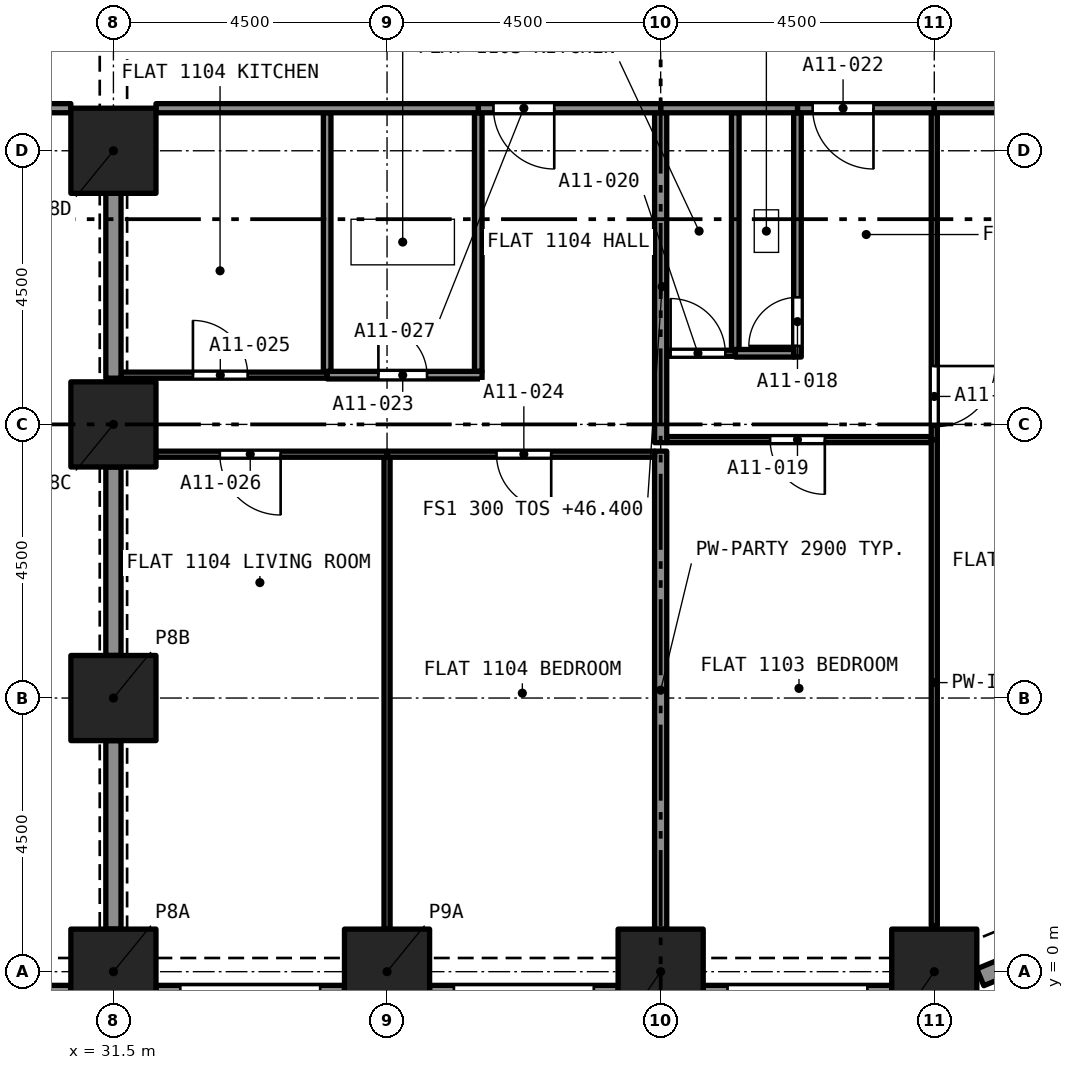
"""IFC4 building model, lengths in metres.
Left out: names, types, materials, properties, quantities, classifications, styles, units other than length and angle.
Written with IfcOpenShell. Run it as: python <this file> out.ifc"""

import sys

from ifc_helpers import new_model, si_unit, direction, frame, frame_2d, origin, origin_2d, place, context, subcontext, project, spatial, rectangle, extrude, element, fill, save


model = new_model("IFC4")
c1 = context("Model", 3, precision=1e-05, world=origin(), true_north=direction((0.0, 1.0)))
c2 = subcontext(c1, "Body", "Model", "MODEL_VIEW")
j1 = project(units=[si_unit("LENGTHUNIT", "METRE"), si_unit("PLANEANGLEUNIT", "RADIAN")], contexts=[c1])
p1 = place(None, origin())
s1 = spatial("IfcSite", under=j1, at=p1, CompositionType="ELEMENT")
p2 = place(p1, origin())
s2 = spatial("IfcBuilding", under=s1, at=p2, CompositionType="ELEMENT")
p3 = place(p2, frame((0.0, 0.0, 46.4)))
s3 = spatial("IfcBuildingStorey", under=s2, at=p3, CompositionType="ELEMENT", Elevation=46.4)
for number, where, z_axis, x_axis in (
    (1, (31.5, 0.0, 0.0), (0.0, 0.0, 1.0), (1.0, 0.0, 0.0)),
    (2, (36.0, 0.0, 0.0), (0.0, 0.0, 1.0), (1.0, 0.0, 0.0)),
    (3, (40.5, 0.0, 0.0), (0.0, 0.0, 1.0), (1.0, 0.0, 0.0)),
    (4, (45.0, 0.0, 0.0), (0.0, 0.0, 1.0), (1.0, 0.0, 0.0)),
    (5, (31.5, 4.5, 0.0), (0.0, 0.0, 1.0), (1.0, 0.0, 0.0)),
    (6, (31.5, 9.0, 0.0), (0.0, 0.0, 1.0), (1.0, 0.0, 0.0)),
    (7, (31.5, 13.5, 0.0), (0.0, 0.0, 1.0), (1.0, 0.0, 0.0)),
):
    element("IfcColumn", number, at=place(p3, frame(where, z_axis=z_axis, x_axis=x_axis)), inside=s3, PredefinedType="COLUMN", context=c2, shape_type="SweptSolid", body=[
        extrude(rectangle(XDim=1.4, YDim=1.4, at=origin_2d()), origin(), (0.0, 0.0, 1.0), 3.2),
    ])
p4 = place(p3, frame((30.8, -0.375, 0.0), z_axis=(0.0, 0.0, 1.0), x_axis=(-1.0, 0.0, 0.0)))
e8 = element("IfcWall", 8, at=p4, inside=s3, PredefinedType="SOLIDWALL", context=c2, shape_type="SweptSolid", body=[
    extrude(rectangle(XDim=3.1, YDim=0.3, at=frame_2d((1.55, 0.0))), origin(), (0.0, 0.0, 1.0), 3.2),
])
p5 = place(p4, frame((0.4, 0.0, 0.45)))
e9 = element("IfcOpeningElement", 9, at=p5, cuts=e8, PredefinedType="OPENING", context=c2, shape_type="SweptSolid", body=[
    extrude(rectangle(XDim=2.3, YDim=1.95, at=frame_2d((1.15, 0.975))), frame((0.0, 0.16, 0.0), z_axis=(0.0, -1.0, 0.0), x_axis=(1.0, 0.0, 0.0)), (0.0, 0.0, 1.0), 0.32),
])
p6 = place(p3, frame((35.3, -0.375, 0.0), z_axis=(0.0, 0.0, 1.0), x_axis=(-1.0, 0.0, 0.0)))
e10 = element("IfcWall", 10, at=p6, inside=s3, PredefinedType="SOLIDWALL", context=c2, shape_type="SweptSolid", body=[
    extrude(rectangle(XDim=3.1, YDim=0.3, at=frame_2d((1.55, 0.0))), origin(), (0.0, 0.0, 1.0), 3.2),
])
p7 = place(p6, frame((0.4, 0.0, 0.45)))
e11 = element("IfcOpeningElement", 11, at=p7, cuts=e10, PredefinedType="OPENING", context=c2, shape_type="SweptSolid", body=[
    extrude(rectangle(XDim=2.3, YDim=1.95, at=frame_2d((1.15, 0.975))), frame((0.0, 0.16, 0.0), z_axis=(0.0, -1.0, 0.0), x_axis=(1.0, 0.0, 0.0)), (0.0, 0.0, 1.0), 0.32),
])
p8 = place(p3, frame((39.8, -0.375, 0.0), z_axis=(0.0, 0.0, 1.0), x_axis=(-1.0, 0.0, 0.0)))
e12 = element("IfcWall", 12, at=p8, inside=s3, PredefinedType="SOLIDWALL", context=c2, shape_type="SweptSolid", body=[
    extrude(rectangle(XDim=3.1, YDim=0.3, at=frame_2d((1.55, 0.0))), origin(), (0.0, 0.0, 1.0), 3.2),
])
p9 = place(p8, frame((0.4, 0.0, 0.45)))
e13 = element("IfcOpeningElement", 13, at=p9, cuts=e12, PredefinedType="OPENING", context=c2, shape_type="SweptSolid", body=[
    extrude(rectangle(XDim=2.3, YDim=1.95, at=frame_2d((1.15, 0.975))), frame((0.0, 0.16, 0.0), z_axis=(0.0, -1.0, 0.0), x_axis=(1.0, 0.0, 0.0)), (0.0, 0.0, 1.0), 0.32),
])
p10 = place(p3, frame((44.3, -0.375, 0.0), z_axis=(0.0, 0.0, 1.0), x_axis=(-1.0, 0.0, 0.0)))
e14 = element("IfcWall", 14, at=p10, inside=s3, PredefinedType="SOLIDWALL", context=c2, shape_type="SweptSolid", body=[
    extrude(rectangle(XDim=3.1, YDim=0.3, at=frame_2d((1.55, 0.0))), origin(), (0.0, 0.0, 1.0), 3.2),
])
p11 = place(p10, frame((0.4, 0.0, 0.45)))
e15 = element("IfcOpeningElement", 15, at=p11, cuts=e14, PredefinedType="OPENING", context=c2, shape_type="SweptSolid", body=[
    extrude(rectangle(XDim=2.3, YDim=1.95, at=frame_2d((1.15, 0.975))), frame((0.0, 0.16, 0.0), z_axis=(0.0, -1.0, 0.0), x_axis=(1.0, 0.0, 0.0)), (0.0, 0.0, 1.0), 0.32),
])
p12 = place(p3, frame((47.48, 0.622, 0.0), z_axis=(0.0, 0.0, 1.0), x_axis=(-0.923903565336, -0.38262540684, 0.0)))
e16 = element("IfcWall", 16, at=p12, inside=s3, PredefinedType="SOLIDWALL", context=c2, shape_type="SweptSolid", body=[
    extrude(rectangle(XDim=1.865, YDim=0.3, at=frame_2d((0.933, 0.0))), origin(), (0.0, 0.0, 1.0), 3.2),
])
p13 = place(p12, frame((0.258, 0.0, 0.45)))
e17 = element("IfcOpeningElement", 17, at=p13, cuts=e16, PredefinedType="OPENING", context=c2, shape_type="SweptSolid", body=[
    extrude(rectangle(XDim=1.1, YDim=1.95, at=frame_2d((0.55, 0.975))), frame((0.0, 0.16, 0.0), z_axis=(0.0, -1.0, 0.0), x_axis=(1.0, 0.0, 0.0)), (0.0, 0.0, 1.0), 0.32),
])
p14 = place(p3, frame((42.75, 10.107, 0.0), z_axis=(0.0, 0.0, 1.0), x_axis=(0.0, 1.0, 0.0)))
e18 = element("IfcWall", 18, at=p14, inside=s3, PredefinedType="PARTITIONING", context=c2, shape_type="SweptSolid", body=[
    extrude(rectangle(XDim=4.018, YDim=0.125, at=frame_2d((2.009, 0.0))), origin(), (0.0, 0.0, 1.0), 2.9),
])
p15 = place(p14, frame((0.183, 0.0, 0.0)))
e19 = element("IfcOpeningElement", 19, at=p15, cuts=e18, PredefinedType="OPENING", context=c2, shape_type="SweptSolid", body=[
    extrude(rectangle(XDim=0.8, YDim=2.1, at=frame_2d((0.4, 1.05))), frame((0.0, 0.073, 0.0), z_axis=(0.0, -1.0, 0.0), x_axis=(1.0, 0.0, 0.0)), (0.0, 0.0, 1.0), 0.145),
])
p16 = place(p3, frame((41.727, 10.17, 0.0), z_axis=(0.0, 0.0, 1.0), x_axis=(1.0, 0.0, 0.0)))
e20 = element("IfcWall", 20, at=p16, inside=s3, PredefinedType="PARTITIONING", context=c2, shape_type="SweptSolid", body=[
    extrude(rectangle(XDim=0.96, YDim=0.125, at=frame_2d((0.48, 0.0))), origin(), (0.0, 0.0, 1.0), 2.9),
])
p17 = place(p3, frame((41.727, 10.232, 0.0), z_axis=(0.0, 0.0, 1.0), x_axis=(0.0, 1.0, 0.0)))
e21 = element("IfcWall", 21, at=p17, inside=s3, PredefinedType="PARTITIONING", context=c2, shape_type="SweptSolid", body=[
    extrude(rectangle(XDim=3.893, YDim=0.125, at=frame_2d((1.946, 0.0))), origin(), (0.0, 0.0, 1.0), 2.9),
])
p18 = place(p3, frame((44.95, 8.75, 0.0), z_axis=(0.0, 0.0, 1.0), x_axis=(-1.0, 0.0, 0.0)))
e22 = element("IfcWall", 22, at=p18, inside=s3, PredefinedType="PARTITIONING", context=c2, shape_type="SweptSolid", body=[
    extrude(rectangle(XDim=4.35, YDim=0.1, at=frame_2d((2.175, 0.0))), origin(), (0.0, 0.0, 1.0), 2.9),
])
p19 = place(p18, frame((1.75, 0.0, 0.0)))
e23 = element("IfcOpeningElement", 23, at=p19, cuts=e22, PredefinedType="OPENING", context=c2, shape_type="SweptSolid", body=[
    extrude(rectangle(XDim=0.9, YDim=2.1, at=frame_2d((0.45, 1.05))), frame((0.0, 0.06, 0.0), z_axis=(0.0, -1.0, 0.0), x_axis=(1.0, 0.0, 0.0)), (0.0, 0.0, 1.0), 0.12),
])
p20 = place(p3, frame((45.0, 0.758, 0.0), z_axis=(0.0, 0.0, 1.0), x_axis=(0.0, 1.0, 0.0)))
e24 = element("IfcWall", 24, at=p20, inside=s3, PredefinedType="PARTITIONING", context=c2, shape_type="SweptSolid", body=[
    extrude(rectangle(XDim=7.992, YDim=0.1, at=frame_2d((3.996, 0.0))), origin(), (0.0, 0.0, 1.0), 2.9),
])
p21 = place(p3, frame((40.5, 0.7, 0.0), z_axis=(0.0, 0.0, 1.0), x_axis=(0.0, 1.0, 0.0)))
e25 = element("IfcWall", 25, at=p21, inside=s3, PredefinedType="PARTITIONING", context=c2, shape_type="SweptSolid", body=[
    extrude(rectangle(XDim=7.86, YDim=0.2, at=frame_2d((3.93, 0.0))), origin(), (0.0, 0.0, 1.0), 2.9),
])
p22 = place(p3, frame((40.6, 10.17, 0.0), z_axis=(0.0, 0.0, 1.0), x_axis=(1.0, 0.0, 0.0)))
e26 = element("IfcWall", 26, at=p22, inside=s3, PredefinedType="PARTITIONING", context=c2, shape_type="SweptSolid", body=[
    extrude(rectangle(XDim=1.127, YDim=0.1, at=frame_2d((0.563, 0.0))), origin(), (0.0, 0.0, 1.0), 2.9),
])
p23 = place(p22, frame((0.064, 0.0, 0.0)))
e27 = element("IfcOpeningElement", 27, at=p23, cuts=e26, PredefinedType="OPENING", context=c2, shape_type="SweptSolid", body=[
    extrude(rectangle(XDim=0.9, YDim=2.1, at=frame_2d((0.45, 1.05))), frame((0.0, 0.06, 0.0), z_axis=(0.0, -1.0, 0.0), x_axis=(1.0, 0.0, 0.0)), (0.0, 0.0, 1.0), 0.12),
])
p24 = place(p3, frame((45.0, 14.125, 0.0), z_axis=(0.0, 0.0, 1.0), x_axis=(0.0, -1.0, 0.0)))
e28 = element("IfcWall", 28, at=p24, inside=s3, PredefinedType="PARTITIONING", context=c2, shape_type="SweptSolid", body=[
    extrude(rectangle(XDim=5.375, YDim=0.1, at=frame_2d((2.688, 0.0))), origin(), (0.0, 0.0, 1.0), 2.9),
])
p25 = place(p24, frame((4.165, 0.0, 0.0)))
e29 = element("IfcOpeningElement", 29, at=p25, cuts=e28, PredefinedType="OPENING", context=c2, shape_type="SweptSolid", body=[
    extrude(rectangle(XDim=1.0, YDim=2.1, at=frame_2d((0.5, 1.05))), frame((0.0, 0.06, 0.0), z_axis=(0.0, -1.0, 0.0), x_axis=(1.0, 0.0, 0.0)), (0.0, 0.0, 1.0), 0.12),
])
p26 = place(p3, frame((40.5, 8.7, 0.0), z_axis=(0.0, 0.0, 1.0), x_axis=(0.0, 1.0, 0.0)))
e30 = element("IfcWall", 30, at=p26, inside=s3, PredefinedType="PARTITIONING", context=c2, shape_type="SweptSolid", body=[
    extrude(rectangle(XDim=5.425, YDim=0.2, at=frame_2d((2.712, 0.0))), origin(), (0.0, 0.0, 1.0), 2.9),
])
p27 = place(p3, frame((45.0, 14.2, 0.0), z_axis=(0.0, 0.0, 1.0), x_axis=(-1.0, 0.0, 0.0)))
e31 = element("IfcWall", 31, at=p27, inside=s3, PredefinedType="PARTITIONING", context=c2, shape_type="SweptSolid", body=[
    extrude(rectangle(XDim=2.25, YDim=0.15, at=frame_2d((1.125, 0.0))), origin(), (0.0, 0.0, 1.0), 2.9),
])
p28 = place(p27, frame((1.0, 0.0, 0.0)))
e32 = element("IfcOpeningElement", 32, at=p28, cuts=e31, PredefinedType="OPENING", context=c2, shape_type="SweptSolid", body=[
    extrude(rectangle(XDim=1.0, YDim=2.1, at=frame_2d((0.5, 1.05))), frame((0.0, 0.085, 0.0), z_axis=(0.0, -1.0, 0.0), x_axis=(1.0, 0.0, 0.0)), (0.0, 0.0, 1.0), 0.17),
])
p29 = place(p3, frame((40.5, 14.2, 0.0), z_axis=(0.0, 0.0, 1.0), x_axis=(1.0, 0.0, 0.0)))
e33 = element("IfcWall", 33, at=p29, inside=s3, PredefinedType="PARTITIONING", context=c2, shape_type="SweptSolid", body=[
    extrude(rectangle(XDim=2.25, YDim=0.15, at=frame_2d((1.125, 0.0))), origin(), (0.0, 0.0, 1.0), 2.9),
])
p30 = place(p3, frame((45.0, 14.2, 0.0), z_axis=(0.0, 0.0, 1.0), x_axis=(1.0, 0.0, 0.0)))
e34 = element("IfcWall", 34, at=p30, inside=s3, PredefinedType="PARTITIONING", context=c2, shape_type="SweptSolid", body=[
    extrude(rectangle(XDim=3.8, YDim=0.15, at=frame_2d((1.9, 0.0))), origin(), (0.0, 0.0, 1.0), 2.9),
])
p31 = place(p3, frame((37.5, 9.873, 0.0), z_axis=(0.0, 0.0, 1.0), x_axis=(0.0, 1.0, 0.0)))
e35 = element("IfcWall", 35, at=p31, inside=s3, PredefinedType="PARTITIONING", context=c2, shape_type="SweptSolid", body=[
    extrude(rectangle(XDim=4.252, YDim=0.125, at=frame_2d((2.126, 0.0))), origin(), (0.0, 0.0, 1.0), 2.9),
])
p32 = place(p3, frame((35.015, 9.81, 0.0), z_axis=(0.0, 0.0, 1.0), x_axis=(1.0, 0.0, 0.0)))
e36 = element("IfcWall", 36, at=p32, inside=s3, PredefinedType="PARTITIONING", context=c2, shape_type="SweptSolid", body=[
    extrude(rectangle(XDim=2.547, YDim=0.125, at=frame_2d((1.273, 0.0))), origin(), (0.0, 0.0, 1.0), 2.9),
])
p33 = place(p32, frame((0.842, 0.0, 0.0)))
e37 = element("IfcOpeningElement", 37, at=p33, cuts=e36, PredefinedType="OPENING", context=c2, shape_type="SweptSolid", body=[
    extrude(rectangle(XDim=0.8, YDim=2.1, at=frame_2d((0.4, 1.05))), frame((0.0, 0.073, 0.0), z_axis=(0.0, -1.0, 0.0), x_axis=(1.0, 0.0, 0.0)), (0.0, 0.0, 1.0), 0.145),
])
p34 = place(p3, frame((35.015, 9.873, 0.0), z_axis=(0.0, 0.0, 1.0), x_axis=(0.0, 1.0, 0.0)))
e38 = element("IfcWall", 38, at=p34, inside=s3, PredefinedType="PARTITIONING", context=c2, shape_type="SweptSolid", body=[
    extrude(rectangle(XDim=4.252, YDim=0.125, at=frame_2d((2.126, 0.0))), origin(), (0.0, 0.0, 1.0), 2.9),
])
p35 = place(p3, frame((40.4, 8.51, 0.0), z_axis=(0.0, 0.0, 1.0), x_axis=(-1.0, 0.0, 0.0)))
e39 = element("IfcWall", 39, at=p35, inside=s3, PredefinedType="PARTITIONING", context=c2, shape_type="SweptSolid", body=[
    extrude(rectangle(XDim=4.4, YDim=0.1, at=frame_2d((2.2, 0.0))), origin(), (0.0, 0.0, 1.0), 2.9),
])
p36 = place(p35, frame((1.7, 0.0, 0.0)))
e40 = element("IfcOpeningElement", 40, at=p36, cuts=e39, PredefinedType="OPENING", context=c2, shape_type="SweptSolid", body=[
    extrude(rectangle(XDim=0.9, YDim=2.1, at=frame_2d((0.45, 1.05))), frame((0.0, 0.06, 0.0), z_axis=(0.0, -1.0, 0.0), x_axis=(1.0, 0.0, 0.0)), (0.0, 0.0, 1.0), 0.12),
])
p37 = place(p3, frame((36.0, 0.7, 0.0), z_axis=(0.0, 0.0, 1.0), x_axis=(0.0, 1.0, 0.0)))
e41 = element("IfcWall", 41, at=p37, inside=s3, PredefinedType="PARTITIONING", context=c2, shape_type="SweptSolid", body=[
    extrude(rectangle(XDim=7.76, YDim=0.1, at=frame_2d((3.88, 0.0))), origin(), (0.0, 0.0, 1.0), 2.9),
])
p38 = place(p3, frame((31.625, 9.81, 0.0), z_axis=(0.0, 0.0, 1.0), x_axis=(1.0, 0.0, 0.0)))
e42 = element("IfcWall", 42, at=p38, inside=s3, PredefinedType="PARTITIONING", context=c2, shape_type="SweptSolid", body=[
    extrude(rectangle(XDim=3.39, YDim=0.1, at=frame_2d((1.695, 0.0))), origin(), (0.0, 0.0, 1.0), 2.9),
])
p39 = place(p38, frame((1.183, 0.0, 0.0)))
e43 = element("IfcOpeningElement", 43, at=p39, cuts=e42, PredefinedType="OPENING", context=c2, shape_type="SweptSolid", body=[
    extrude(rectangle(XDim=0.9, YDim=2.1, at=frame_2d((0.45, 1.05))), frame((0.0, 0.06, 0.0), z_axis=(0.0, -1.0, 0.0), x_axis=(1.0, 0.0, 0.0)), (0.0, 0.0, 1.0), 0.12),
])
p40 = place(p3, frame((36.0, 8.51, 0.0), z_axis=(0.0, 0.0, 1.0), x_axis=(-1.0, 0.0, 0.0)))
e44 = element("IfcWall", 44, at=p40, inside=s3, PredefinedType="PARTITIONING", context=c2, shape_type="SweptSolid", body=[
    extrude(rectangle(XDim=3.8, YDim=0.1, at=frame_2d((1.9, 0.0))), origin(), (0.0, 0.0, 1.0), 2.9),
])
p41 = place(p40, frame((1.75, 0.0, 0.0)))
e45 = element("IfcOpeningElement", 45, at=p41, cuts=e44, PredefinedType="OPENING", context=c2, shape_type="SweptSolid", body=[
    extrude(rectangle(XDim=1.0, YDim=2.1, at=frame_2d((0.5, 1.05))), frame((0.0, 0.06, 0.0), z_axis=(0.0, -1.0, 0.0), x_axis=(1.0, 0.0, 0.0)), (0.0, 0.0, 1.0), 0.12),
])
p42 = place(p3, frame((40.5, 14.2, 0.0), z_axis=(0.0, 0.0, 1.0), x_axis=(-1.0, 0.0, 0.0)))
e46 = element("IfcWall", 46, at=p42, inside=s3, PredefinedType="PARTITIONING", context=c2, shape_type="SweptSolid", body=[
    extrude(rectangle(XDim=3.0, YDim=0.15, at=frame_2d((1.5, 0.0))), origin(), (0.0, 0.0, 1.0), 2.9),
])
p43 = place(p42, frame((1.75, 0.0, 0.0)))
e47 = element("IfcOpeningElement", 47, at=p43, cuts=e46, PredefinedType="OPENING", context=c2, shape_type="SweptSolid", body=[
    extrude(rectangle(XDim=1.0, YDim=2.1, at=frame_2d((0.5, 1.05))), frame((0.0, 0.085, 0.0), z_axis=(0.0, -1.0, 0.0), x_axis=(1.0, 0.0, 0.0)), (0.0, 0.0, 1.0), 0.17),
])
p44 = place(p3, frame((31.5, 9.76, 0.0), z_axis=(0.0, 0.0, 1.0), x_axis=(0.0, 1.0, 0.0)))
e48 = element("IfcWall", 48, at=p44, inside=s3, PredefinedType="PARTITIONING", context=c2, shape_type="SweptSolid", body=[
    extrude(rectangle(XDim=3.04, YDim=0.25, at=frame_2d((1.52, 0.0))), origin(), (0.0, 0.0, 1.0), 2.38),
])
p45 = place(p3, frame((32.2, 14.2, 0.0), z_axis=(0.0, 0.0, 1.0), x_axis=(1.0, 0.0, 0.0)))
e49 = element("IfcWall", 49, at=p45, inside=s3, PredefinedType="PARTITIONING", context=c2, shape_type="SweptSolid", body=[
    extrude(rectangle(XDim=5.3, YDim=0.15, at=frame_2d((2.65, 0.0))), origin(), (0.0, 0.0, 1.0), 2.9),
])
for number, where, z_axis, x_axis in (
    (50, (31.5, 0.7, 0.0), (0.0, 0.0, 1.0), (0.0, 1.0, 0.0)),
    (51, (31.5, 5.2, 0.0), (0.0, 0.0, 1.0), (0.0, 1.0, 0.0)),
):
    element("IfcWall", number, at=place(p3, frame(where, z_axis=z_axis, x_axis=x_axis)), inside=s3, PredefinedType="PARTITIONING", context=c2, shape_type="SweptSolid", body=[
        extrude(rectangle(XDim=3.1, YDim=0.25, at=frame_2d((1.55, 0.0))), origin(), (0.0, 0.0, 1.0), 2.38),
    ])
p46 = place(p3, frame((30.8, 14.2, 0.0), z_axis=(0.0, 0.0, 1.0), x_axis=(-1.0, 0.0, 0.0)))
e52 = element("IfcWall", 52, at=p46, inside=s3, PredefinedType="PARTITIONING", context=c2, shape_type="SweptSolid", body=[
    extrude(rectangle(XDim=3.8, YDim=0.15, at=frame_2d((1.9, 0.0))), origin(), (0.0, 0.0, 1.0), 2.75),
])
p47 = place(p46, frame((1.05, 0.0, 0.0)))
e53 = element("IfcOpeningElement", 53, at=p47, cuts=e52, PredefinedType="OPENING", context=c2, shape_type="SweptSolid", body=[
    extrude(rectangle(XDim=1.0, YDim=2.1, at=frame_2d((0.5, 1.05))), frame((0.0, 0.085, 0.0), z_axis=(0.0, -1.0, 0.0), x_axis=(1.0, 0.0, 0.0)), (0.0, 0.0, 1.0), 0.17),
])
p48 = place(p15, origin())
e54 = element("IfcDoor", 54, at=p48, inside=s3, OperationType="SINGLE_SWING_LEFT", PredefinedType="DOOR", context=c2, shape_type="SweptSolid", body=[
    extrude(rectangle(XDim=0.8, YDim=2.1, at=frame_2d((0.4, 1.05))), frame((0.0, 0.025, 0.0), z_axis=(0.0, -1.0, 0.0), x_axis=(1.0, 0.0, 0.0)), (0.0, 0.0, 1.0), 0.05),
])
fill(e19, e54)
p49 = place(p19, origin())
e55 = element("IfcDoor", 55, at=p49, inside=s3, OperationType="SINGLE_SWING_RIGHT", PredefinedType="DOOR", context=c2, shape_type="SweptSolid", body=[
    extrude(rectangle(XDim=0.9, YDim=2.1, at=frame_2d((0.45, 1.05))), frame((0.0, 0.025, 0.0), z_axis=(0.0, -1.0, 0.0), x_axis=(1.0, 0.0, 0.0)), (0.0, 0.0, 1.0), 0.05),
])
fill(e23, e55)
p50 = place(p23, origin())
e56 = element("IfcDoor", 56, at=p50, inside=s3, OperationType="SINGLE_SWING_LEFT", PredefinedType="DOOR", context=c2, shape_type="SweptSolid", body=[
    extrude(rectangle(XDim=0.9, YDim=2.1, at=frame_2d((0.45, 1.05))), frame((0.0, 0.025, 0.0), z_axis=(0.0, -1.0, 0.0), x_axis=(1.0, 0.0, 0.0)), (0.0, 0.0, 1.0), 0.05),
])
fill(e27, e56)
p51 = place(p25, origin())
e57 = element("IfcDoor", 57, at=p51, inside=s3, OperationType="SINGLE_SWING_RIGHT", PredefinedType="DOOR", context=c2, shape_type="SweptSolid", body=[
    extrude(rectangle(XDim=1.0, YDim=2.1, at=frame_2d((0.5, 1.05))), frame((0.0, 0.025, 0.0), z_axis=(0.0, -1.0, 0.0), x_axis=(1.0, 0.0, 0.0)), (0.0, 0.0, 1.0), 0.05),
])
fill(e29, e57)
p52 = place(p28, origin())
e58 = element("IfcDoor", 58, at=p52, inside=s3, OperationType="SINGLE_SWING_RIGHT", PredefinedType="DOOR", context=c2, shape_type="SweptSolid", body=[
    extrude(rectangle(XDim=1.0, YDim=2.1, at=frame_2d((0.5, 1.05))), frame((0.0, 0.025, 0.0), z_axis=(0.0, -1.0, 0.0), x_axis=(1.0, 0.0, 0.0)), (0.0, 0.0, 1.0), 0.05),
])
fill(e32, e58)
p53 = place(p33, origin())
e59 = element("IfcDoor", 59, at=p53, inside=s3, OperationType="SINGLE_SWING_LEFT", PredefinedType="DOOR", context=c2, shape_type="SweptSolid", body=[
    extrude(rectangle(XDim=0.8, YDim=2.1, at=frame_2d((0.4, 1.05))), frame((0.0, 0.025, 0.0), z_axis=(0.0, -1.0, 0.0), x_axis=(1.0, 0.0, 0.0)), (0.0, 0.0, 1.0), 0.05),
])
fill(e37, e59)
p54 = place(p36, origin())
e60 = element("IfcDoor", 60, at=p54, inside=s3, OperationType="SINGLE_SWING_LEFT", PredefinedType="DOOR", context=c2, shape_type="SweptSolid", body=[
    extrude(rectangle(XDim=0.9, YDim=2.1, at=frame_2d((0.45, 1.05))), frame((0.0, 0.025, 0.0), z_axis=(0.0, -1.0, 0.0), x_axis=(1.0, 0.0, 0.0)), (0.0, 0.0, 1.0), 0.05),
])
fill(e40, e60)
p55 = place(p39, origin())
e61 = element("IfcDoor", 61, at=p55, inside=s3, OperationType="SINGLE_SWING_LEFT", PredefinedType="DOOR", context=c2, shape_type="SweptSolid", body=[
    extrude(rectangle(XDim=0.9, YDim=2.1, at=frame_2d((0.45, 1.05))), frame((0.0, 0.025, 0.0), z_axis=(0.0, -1.0, 0.0), x_axis=(1.0, 0.0, 0.0)), (0.0, 0.0, 1.0), 0.05),
])
fill(e43, e61)
p56 = place(p41, origin())
e62 = element("IfcDoor", 62, at=p56, inside=s3, OperationType="SINGLE_SWING_RIGHT", PredefinedType="DOOR", context=c2, shape_type="SweptSolid", body=[
    extrude(rectangle(XDim=1.0, YDim=2.1, at=frame_2d((0.5, 1.05))), frame((0.0, 0.025, 0.0), z_axis=(0.0, -1.0, 0.0), x_axis=(1.0, 0.0, 0.0)), (0.0, 0.0, 1.0), 0.05),
])
fill(e45, e62)
p57 = place(p43, origin())
e63 = element("IfcDoor", 63, at=p57, inside=s3, OperationType="SINGLE_SWING_RIGHT", PredefinedType="DOOR", context=c2, shape_type="SweptSolid", body=[
    extrude(rectangle(XDim=1.0, YDim=2.1, at=frame_2d((0.5, 1.05))), frame((0.0, 0.025, 0.0), z_axis=(0.0, -1.0, 0.0), x_axis=(1.0, 0.0, 0.0)), (0.0, 0.0, 1.0), 0.05),
])
fill(e47, e63)
save(model, sys.argv[1])
